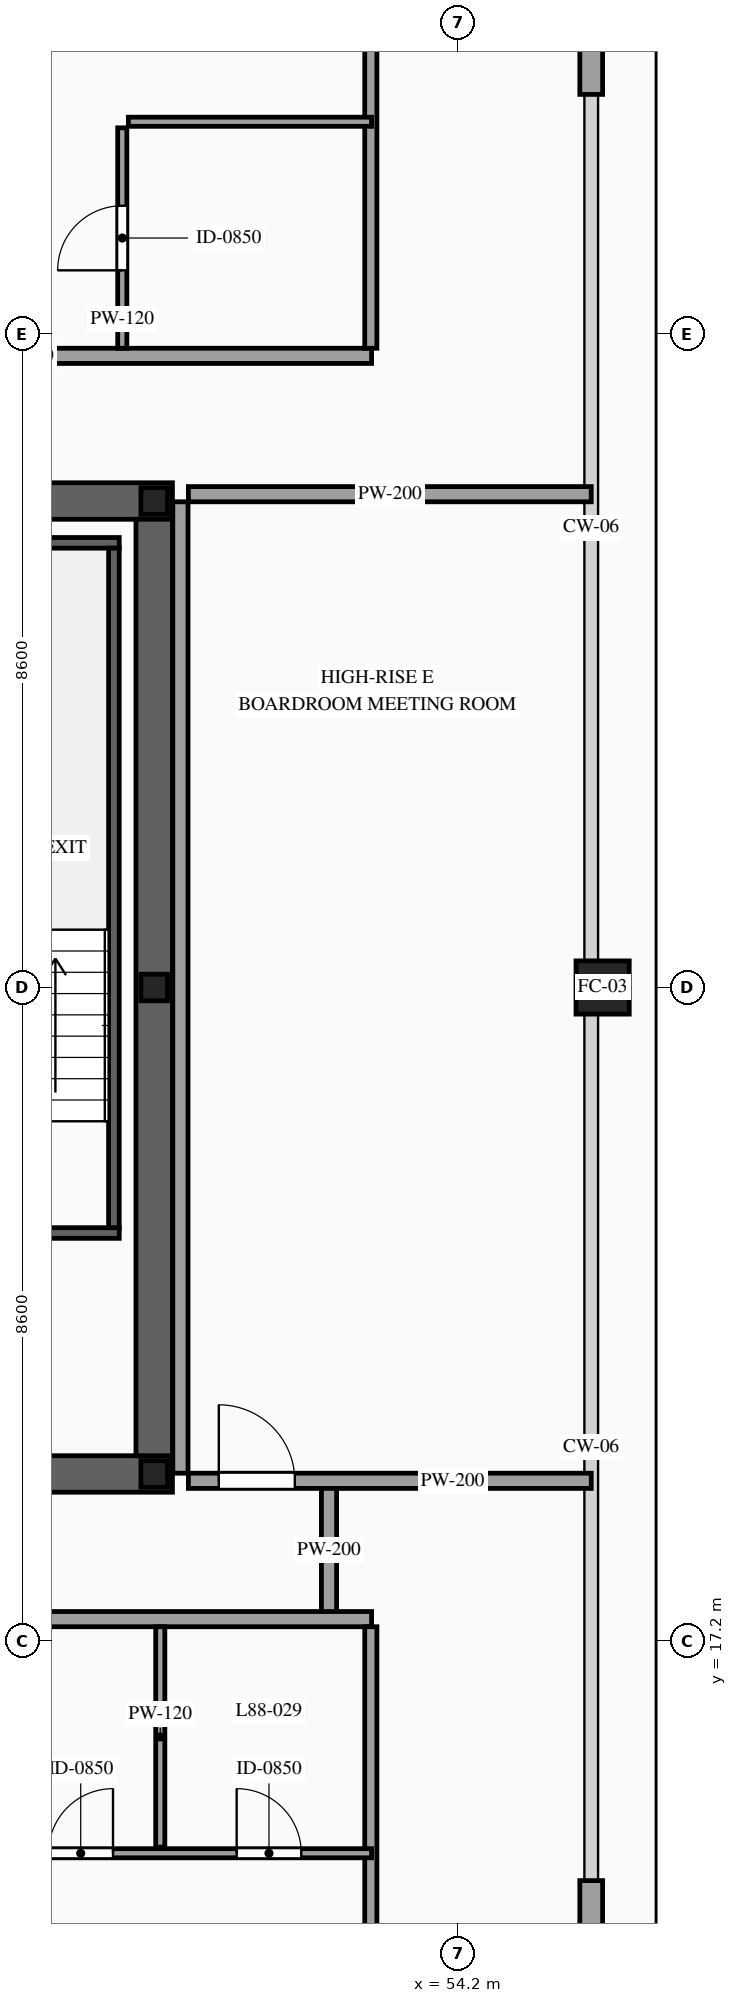
"""IFC4 building model, lengths in metres.
Left out: names, types, materials, properties, quantities, classifications, styles, units other than length and angle.
Written with IfcOpenShell. Run it as: python <this file> out.ifc"""

import sys

from ifc_helpers import new_model, si_unit, direction, frame, frame_2d, origin, origin_2d, place, context, subcontext, project, spatial, rectangle, hollow_rectangle, i_section, extrude, source, transform, mapped, element, fill, save


model = new_model("IFC4")
c1 = context("Model", 3, precision=1e-05, world=origin(), true_north=direction((0.0, 1.0)))
c2 = subcontext(c1, "Body", "Model", "MODEL_VIEW")
j1 = project(units=[si_unit("LENGTHUNIT", "METRE"), si_unit("PLANEANGLEUNIT", "RADIAN")], contexts=[c1])
p1 = place(None, origin())
s1 = spatial("IfcSite", under=j1, at=p1, CompositionType="ELEMENT")
p2 = place(p1, origin())
s2 = spatial("IfcBuilding", under=s1, at=p2, CompositionType="ELEMENT")
p3 = place(p2, frame((0.0, 0.0, 328.7)))
s3 = spatial("IfcBuildingStorey", under=s2, at=p3, CompositionType="ELEMENT", Elevation=328.7)
p4 = place(p3, frame((23.56, 19.4, 0.0), z_axis=(0.0, 0.0, 1.0), x_axis=(1.0, 0.0, 0.0)))
e1 = element("IfcWall", 1, at=p4, inside=s3, PredefinedType="SHEAR", context=c2, shape_type="SweptSolid", body=[
    extrude(rectangle(XDim=26.88, YDim=0.48, at=frame_2d((13.44, 0.0))), origin(), (0.0, 0.0, 1.0), 3.5),
])
p5 = place(p4, frame((1.89, 0.0, 0.0)))
e2 = element("IfcOpeningElement", 2, at=p5, cuts=e1, PredefinedType="OPENING", context=c2, shape_type="SweptSolid", body=[
    extrude(rectangle(XDim=1.1, YDim=2.2, at=frame_2d((0.55, 1.1))), frame((0.0, 0.255, 0.0), z_axis=(0.0, -1.0, 0.0), x_axis=(1.0, 0.0, 0.0)), (0.0, 0.0, 1.0), 0.51),
])
p6 = place(p4, frame((9.79, 0.0, 0.0)))
e3 = element("IfcOpeningElement", 3, at=p6, cuts=e1, PredefinedType="OPENING", context=c2, shape_type="SweptSolid", body=[
    extrude(rectangle(XDim=1.1, YDim=2.2, at=frame_2d((0.55, 1.1))), frame((0.0, 0.255, 0.0), z_axis=(0.0, -1.0, 0.0), x_axis=(1.0, 0.0, 0.0)), (0.0, 0.0, 1.0), 0.51),
])
p7 = place(p4, frame((22.99, 0.0, 0.0)))
e4 = element("IfcOpeningElement", 4, at=p7, cuts=e1, PredefinedType="OPENING", context=c2, shape_type="SweptSolid", body=[
    extrude(rectangle(XDim=1.1, YDim=2.2, at=frame_2d((0.55, 1.1))), frame((0.0, 0.255, 0.0), z_axis=(0.0, -1.0, 0.0), x_axis=(1.0, 0.0, 0.0)), (0.0, 0.0, 1.0), 0.51),
])
p8 = place(p4, frame((19.61, 0.0, 0.0)))
e5 = element("IfcOpeningElement", 5, at=p8, cuts=e1, PredefinedType="OPENING", context=c2, shape_type="SweptSolid", body=[
    extrude(rectangle(XDim=0.9, YDim=2.15, at=frame_2d((0.45, 1.075))), frame((0.0, 0.255, 0.0), z_axis=(0.0, -1.0, 0.0), x_axis=(1.0, 0.0, 0.0)), (0.0, 0.0, 1.0), 0.51),
])
p9 = place(p4, frame((18.17, 0.0, 0.0)))
e6 = element("IfcOpeningElement", 6, at=p9, cuts=e1, PredefinedType="OPENING", context=c2, shape_type="SweptSolid", body=[
    extrude(rectangle(XDim=0.9, YDim=2.15, at=frame_2d((0.45, 1.075))), frame((0.0, 0.255, 0.0), z_axis=(0.0, -1.0, 0.0), x_axis=(1.0, 0.0, 0.0)), (0.0, 0.0, 1.0), 0.51),
])
p10 = place(p3, frame((23.56, 32.2, 0.0), z_axis=(0.0, 0.0, 1.0), x_axis=(1.0, 0.0, 0.0)))
e7 = element("IfcWall", 7, at=p10, inside=s3, PredefinedType="SHEAR", context=c2, shape_type="SweptSolid", body=[
    extrude(rectangle(XDim=26.88, YDim=0.48, at=frame_2d((13.44, 0.0))), origin(), (0.0, 0.0, 1.0), 3.5),
])
p11 = place(p10, frame((4.51, 0.0, 0.0)))
e8 = element("IfcOpeningElement", 8, at=p11, cuts=e7, PredefinedType="OPENING", context=c2, shape_type="SweptSolid", body=[
    extrude(rectangle(XDim=0.9, YDim=2.15, at=frame_2d((0.45, 1.075))), frame((0.0, 0.255, 0.0), z_axis=(0.0, -1.0, 0.0), x_axis=(1.0, 0.0, 0.0)), (0.0, 0.0, 1.0), 0.51),
])
p12 = place(p10, frame((9.79, 0.0, 0.0)))
e9 = element("IfcOpeningElement", 9, at=p12, cuts=e7, PredefinedType="OPENING", context=c2, shape_type="SweptSolid", body=[
    extrude(rectangle(XDim=1.1, YDim=2.2, at=frame_2d((0.55, 1.1))), frame((0.0, 0.255, 0.0), z_axis=(0.0, -1.0, 0.0), x_axis=(1.0, 0.0, 0.0)), (0.0, 0.0, 1.0), 0.51),
])
p13 = place(p10, frame((15.64, 0.0, 0.0)))
e10 = element("IfcOpeningElement", 10, at=p13, cuts=e7, PredefinedType="OPENING", context=c2, shape_type="SweptSolid", body=[
    extrude(rectangle(XDim=1.1, YDim=2.2, at=frame_2d((0.55, 1.1))), frame((0.0, 0.255, 0.0), z_axis=(0.0, -1.0, 0.0), x_axis=(1.0, 0.0, 0.0)), (0.0, 0.0, 1.0), 0.51),
])
p14 = place(p10, frame((18.74, 0.0, 0.0)))
e11 = element("IfcOpeningElement", 11, at=p14, cuts=e7, PredefinedType="OPENING", context=c2, shape_type="SweptSolid", body=[
    extrude(rectangle(XDim=1.1, YDim=2.2, at=frame_2d((0.55, 1.1))), frame((0.0, 0.255, 0.0), z_axis=(0.0, -1.0, 0.0), x_axis=(1.0, 0.0, 0.0)), (0.0, 0.0, 1.0), 0.51),
])
m1 = source(origin(), c2, "Body", "SweptSolid", [
    extrude(rectangle(XDim=12.32, YDim=0.48, at=frame_2d((6.16, 0.0))), origin(), (0.0, 0.0, 1.0), 3.5),
])
p15 = place(p3, frame((50.2, 19.64, 0.0), z_axis=(0.0, 0.0, 1.0), x_axis=(0.0, 1.0, 0.0)))
e12 = element("IfcWall", 12, at=p15, inside=s3, PredefinedType="SHEAR", context=c2, shape_type="MappedRepresentation", body=[
    mapped(m1, transform((0.0, 0.0, 0.0), scale=1.0)),
])
m2 = source(origin(), c2, "Body", "SweptSolid", [
    extrude(i_section(OverallWidth=0.35, OverallDepth=0.35, WebThickness=0.012, FlangeThickness=0.019, at=origin_2d()), origin(), (0.0, 0.0, 1.0), 3.5),
])
for number, where, z_axis, x_axis in (
    (13, (50.2, 19.4, 0.0), (0.0, 0.0, 1.0), (1.0, 0.0, 0.0)),
    (14, (50.2, 25.8, 0.0), (0.0, 0.0, 1.0), (1.0, 0.0, 0.0)),
    (15, (50.2, 32.2, 0.0), (0.0, 0.0, 1.0), (1.0, 0.0, 0.0)),
):
    element("IfcColumn", number, at=place(p3, frame(where, z_axis=z_axis, x_axis=x_axis)), inside=s3, PredefinedType="COLUMN", context=c2, shape_type="MappedRepresentation", body=[
        mapped(m2, transform((0.0, 0.0, 0.0), scale=1.0)),
    ])
m3 = source(origin(), c2, "Body", "SweptSolid", [
    extrude(hollow_rectangle(XDim=0.7, YDim=0.7, WallThickness=0.032, at=origin_2d()), origin(), (0.0, 0.0, 1.0), 3.5),
])
p16 = place(p3, frame((56.1, 25.8, 0.0), z_axis=(0.0, 0.0, 1.0), x_axis=(1.0, 0.0, 0.0)))
e16 = element("IfcColumn", 16, at=p16, inside=s3, PredefinedType="COLUMN", context=c2, shape_type="MappedRepresentation", body=[
    mapped(m3, transform((0.0, 0.0, 0.0), scale=1.0)),
])
m4 = source(origin(), c2, "Body", "SweptSolid", [
    extrude(rectangle(XDim=3.25, YDim=0.3, at=frame_2d((1.625, 0.0))), origin(), (0.0, 0.0, 1.0), 2.885),
])
for number, where, z_axis, x_axis in (
    (17, (55.95, 10.8, 0.0), (0.0, 0.0, 1.0), (0.0, 1.0, 0.0)),
    (18, (55.95, 37.55, 0.0), (0.0, 0.0, 1.0), (0.0, 1.0, 0.0)),
):
    element("IfcWall", number, at=place(p3, frame(where, z_axis=z_axis, x_axis=x_axis)), inside=s3, PredefinedType="SOLIDWALL", context=c2, shape_type="MappedRepresentation", body=[
        mapped(m4, transform((0.0, 0.0, 0.0), scale=1.0)),
    ])
p17 = place(p3, frame((46.46, 22.57, 0.0), z_axis=(0.0, 0.0, 1.0), x_axis=(1.0, 0.0, 0.0)))
e19 = element("IfcWall", 19, at=p17, inside=s3, PredefinedType="SOLIDWALL", context=c2, shape_type="SweptSolid", body=[
    extrude(rectangle(XDim=3.28, YDim=0.14, at=frame_2d((1.64, 0.0))), origin(), (0.0, 0.0, 1.0), 3.28),
])
p18 = place(p17, frame((1.09, 0.0, 0.0)))
e20 = element("IfcOpeningElement", 20, at=p18, cuts=e19, PredefinedType="OPENING", context=c2, shape_type="SweptSolid", body=[
    extrude(rectangle(XDim=1.1, YDim=2.2, at=frame_2d((0.55, 1.1))), frame((0.0, 0.085, 0.0), z_axis=(0.0, -1.0, 0.0), x_axis=(1.0, 0.0, 0.0)), (0.0, 0.0, 1.0), 0.17),
])
m5 = source(origin(), c2, "Body", "SweptSolid", [
    extrude(rectangle(XDim=3.28, YDim=0.14, at=frame_2d((1.64, 0.0))), origin(), (0.0, 0.0, 1.0), 3.28),
])
p19 = place(p3, frame((46.46, 31.65, 0.0), z_axis=(0.0, 0.0, 1.0), x_axis=(1.0, 0.0, 0.0)))
e21 = element("IfcWall", 21, at=p19, inside=s3, PredefinedType="SOLIDWALL", context=c2, shape_type="MappedRepresentation", body=[
    mapped(m5, transform((0.0, 0.0, 0.0), scale=1.0)),
])
m6 = source(origin(), c2, "Body", "SweptSolid", [
    extrude(rectangle(XDim=8.94, YDim=0.14, at=frame_2d((4.47, 0.0))), origin(), (0.0, 0.0, 1.0), 3.28),
])
p20 = place(p3, frame((49.67, 22.64, 0.0), z_axis=(0.0, 0.0, 1.0), x_axis=(0.0, 1.0, 0.0)))
e22 = element("IfcWall", 22, at=p20, inside=s3, PredefinedType="SOLIDWALL", context=c2, shape_type="MappedRepresentation", body=[
    mapped(m6, transform((0.0, 0.0, 0.0), scale=1.0)),
])
m7 = source(origin(), c2, "Body", "SweptSolid", [
    extrude(rectangle(XDim=1.7, YDim=0.2, at=frame_2d((0.85, 0.0))), origin(), (0.0, 0.0, 1.0), 3.28),
])
p21 = place(p3, frame((52.5, 17.55, 0.0), z_axis=(0.0, 0.0, 1.0), x_axis=(0.0, 1.0, 0.0)))
e23 = element("IfcWall", 23, at=p21, inside=s3, PredefinedType="PARTITIONING", context=c2, shape_type="MappedRepresentation", body=[
    mapped(m7, transform((0.0, 0.0, 0.0), scale=1.0)),
])
p22 = place(p3, frame((37.08, 17.49, 0.0), z_axis=(0.0, 0.0, 1.0), x_axis=(1.0, 0.0, 0.0)))
e24 = element("IfcWall", 24, at=p22, inside=s3, PredefinedType="PARTITIONING", context=c2, shape_type="SweptSolid", body=[
    extrude(rectangle(XDim=15.98, YDim=0.2, at=frame_2d((7.99, 0.0))), origin(), (0.0, 0.0, 1.0), 3.28),
])
p23 = place(p22, frame((8.816, 0.0, 0.0)))
e25 = element("IfcOpeningElement", 25, at=p23, cuts=e24, PredefinedType="OPENING", context=c2, shape_type="SweptSolid", body=[
    extrude(rectangle(XDim=1.0, YDim=2.2, at=frame_2d((0.5, 1.1))), frame((0.0, 0.115, 0.0), z_axis=(0.0, -1.0, 0.0), x_axis=(1.0, 0.0, 0.0)), (0.0, 0.0, 1.0), 0.23),
])
m8 = source(origin(), c2, "Body", "SweptSolid", [
    extrude(rectangle(XDim=10.39, YDim=0.16, at=frame_2d((5.195, 0.0))), origin(), (0.0, 0.0, 1.0), 3.28),
])
p24 = place(p3, frame((53.05, 7.0, 0.0), z_axis=(0.0, 0.0, 1.0), x_axis=(0.0, 1.0, 0.0)))
e26 = element("IfcWall", 26, at=p24, inside=s3, PredefinedType="PARTITIONING", context=c2, shape_type="MappedRepresentation", body=[
    mapped(m8, transform((0.0, 0.0, 0.0), scale=1.0)),
])
m9 = source(origin(), c2, "Body", "SweptSolid", [
    extrude(rectangle(XDim=2.9, YDim=0.12, at=frame_2d((1.45, 0.0))), origin(), (0.0, 0.0, 1.0), 2.825),
])
p25 = place(p3, frame((50.28, 14.49, 0.0), z_axis=(0.0, 0.0, 1.0), x_axis=(0.0, 1.0, 0.0)))
e27 = element("IfcWall", 27, at=p25, inside=s3, PredefinedType="PARTITIONING", context=c2, shape_type="MappedRepresentation", body=[
    mapped(m9, transform((0.0, 0.0, 0.0), scale=1.0)),
])
p26 = place(p3, frame((48.266, 14.41, 0.0), z_axis=(0.0, 0.0, 1.0), x_axis=(1.0, 0.0, 0.0)))
e28 = element("IfcWall", 28, at=p26, inside=s3, PredefinedType="PARTITIONING", context=c2, shape_type="SweptSolid", body=[
    extrude(rectangle(XDim=4.794, YDim=0.12, at=frame_2d((2.397, 0.0))), origin(), (0.0, 0.0, 1.0), 3.28),
])
p27 = place(p26, frame((3.019, 0.0, 0.0)))
e29 = element("IfcOpeningElement", 29, at=p27, cuts=e28, PredefinedType="OPENING", context=c2, shape_type="SweptSolid", body=[
    extrude(rectangle(XDim=0.85, YDim=2.1, at=frame_2d((0.425, 1.05))), frame((0.0, 0.075, 0.0), z_axis=(0.0, -1.0, 0.0), x_axis=(1.0, 0.0, 0.0)), (0.0, 0.0, 1.0), 0.15),
])
p28 = place(p26, frame((0.542, 0.0, 0.0)))
e30 = element("IfcOpeningElement", 30, at=p28, cuts=e28, PredefinedType="OPENING", context=c2, shape_type="SweptSolid", body=[
    extrude(rectangle(XDim=0.85, YDim=2.1, at=frame_2d((0.425, 1.05))), frame((0.0, 0.075, 0.0), z_axis=(0.0, -1.0, 0.0), x_axis=(1.0, 0.0, 0.0)), (0.0, 0.0, 1.0), 0.15),
])
p29 = place(p3, frame((36.438, 34.11, 0.0), z_axis=(0.0, 0.0, 1.0), x_axis=(1.0, 0.0, 0.0)))
e31 = element("IfcWall", 31, at=p29, inside=s3, PredefinedType="PARTITIONING", context=c2, shape_type="SweptSolid", body=[
    extrude(rectangle(XDim=16.622, YDim=0.2, at=frame_2d((8.311, 0.0))), origin(), (0.0, 0.0, 1.0), 3.28),
])
p30 = place(p29, frame((6.186, 0.0, 0.0)))
e32 = element("IfcOpeningElement", 32, at=p30, cuts=e31, PredefinedType="OPENING", context=c2, shape_type="SweptSolid", body=[
    extrude(rectangle(XDim=1.0, YDim=2.2, at=frame_2d((0.5, 1.1))), frame((0.0, 0.115, 0.0), z_axis=(0.0, -1.0, 0.0), x_axis=(1.0, 0.0, 0.0)), (0.0, 0.0, 1.0), 0.23),
])
m10 = source(origin(), c2, "Body", "SweptSolid", [
    extrude(rectangle(XDim=10.39, YDim=0.16, at=frame_2d((5.195, 0.0))), origin(), (0.0, 0.0, 1.0), 3.28),
])
p31 = place(p3, frame((53.05, 34.21, 0.0), z_axis=(0.0, 0.0, 1.0), x_axis=(0.0, 1.0, 0.0)))
e33 = element("IfcWall", 33, at=p31, inside=s3, PredefinedType="PARTITIONING", context=c2, shape_type="MappedRepresentation", body=[
    mapped(m10, transform((0.0, 0.0, 0.0), scale=1.0)),
])
m11 = source(origin(), c2, "Body", "SweptSolid", [
    extrude(rectangle(XDim=3.2, YDim=0.12, at=frame_2d((1.6, 0.0))), origin(), (0.0, 0.0, 1.0), 3.28),
])
p32 = place(p3, frame((49.86, 37.19, 0.0), z_axis=(0.0, 0.0, 1.0), x_axis=(1.0, 0.0, 0.0)))
e34 = element("IfcWall", 34, at=p32, inside=s3, PredefinedType="PARTITIONING", context=c2, shape_type="MappedRepresentation", body=[
    mapped(m11, transform((0.0, 0.0, 0.0), scale=1.0)),
])
p33 = place(p3, frame((49.78, 34.21, 0.0), z_axis=(0.0, 0.0, 1.0), x_axis=(0.0, 1.0, 0.0)))
e35 = element("IfcWall", 35, at=p33, inside=s3, PredefinedType="PARTITIONING", context=c2, shape_type="SweptSolid", body=[
    extrude(rectangle(XDim=2.9, YDim=0.12, at=frame_2d((1.45, 0.0))), origin(), (0.0, 0.0, 1.0), 3.28),
])
p34 = place(p33, frame((1.025, 0.0, 0.0)))
e36 = element("IfcOpeningElement", 36, at=p34, cuts=e35, PredefinedType="OPENING", context=c2, shape_type="SweptSolid", body=[
    extrude(rectangle(XDim=0.85, YDim=2.1, at=frame_2d((0.425, 1.05))), frame((0.0, 0.075, 0.0), z_axis=(0.0, -1.0, 0.0), x_axis=(1.0, 0.0, 0.0)), (0.0, 0.0, 1.0), 0.15),
])
p35 = place(p3, frame((50.65, 19.31, 0.0), z_axis=(0.0, 0.0, 1.0), x_axis=(1.0, 0.0, 0.0)))
e37 = element("IfcWall", 37, at=p35, inside=s3, PredefinedType="PARTITIONING", context=c2, shape_type="SweptSolid", body=[
    extrude(rectangle(XDim=5.3, YDim=0.2, at=frame_2d((2.65, 0.0))), origin(), (0.0, 0.0, 1.0), 2.825),
])
p36 = place(p35, frame((0.4, 0.0, 0.0)))
e38 = element("IfcOpeningElement", 38, at=p36, cuts=e37, PredefinedType="OPENING", context=c2, shape_type="SweptSolid", body=[
    extrude(rectangle(XDim=1.0, YDim=2.2, at=frame_2d((0.5, 1.1))), frame((0.0, 0.115, 0.0), z_axis=(0.0, -1.0, 0.0), x_axis=(1.0, 0.0, 0.0)), (0.0, 0.0, 1.0), 0.23),
])
m12 = source(origin(), c2, "Body", "SweptSolid", [
    extrude(rectangle(XDim=5.3, YDim=0.2, at=frame_2d((2.65, 0.0))), origin(), (0.0, 0.0, 1.0), 2.825),
])
p37 = place(p3, frame((50.65, 32.29, 0.0), z_axis=(0.0, 0.0, 1.0), x_axis=(1.0, 0.0, 0.0)))
e39 = element("IfcWall", 39, at=p37, inside=s3, PredefinedType="PARTITIONING", context=c2, shape_type="MappedRepresentation", body=[
    mapped(m12, transform((0.0, 0.0, 0.0), scale=1.0)),
])
m13 = source(origin(), c2, "Body", "SweptSolid", [
    extrude(rectangle(XDim=12.78, YDim=0.2, at=frame_2d((6.39, 0.0))), origin(), (0.0, 0.0, 1.0), 3.28),
])
p38 = place(p3, frame((50.545, 19.41, 0.0), z_axis=(0.0, 0.0, 1.0), x_axis=(0.0, 1.0, 0.0)))
e40 = element("IfcWall", 40, at=p38, inside=s3, PredefinedType="PARTITIONING", context=c2, shape_type="MappedRepresentation", body=[
    mapped(m13, transform((0.0, 0.0, 0.0), scale=1.0)),
])
m14 = source(origin(), c2, "Body", "SweptSolid", [
    extrude(rectangle(XDim=0.85, YDim=2.1, at=frame_2d((0.425, 1.05))), frame((0.0, 0.025, 0.0), z_axis=(0.0, -1.0, 0.0), x_axis=(1.0, 0.0, 0.0)), (0.0, 0.0, 1.0), 0.05),
])
p39 = place(p27, origin())
e41 = element("IfcDoor", 41, at=p39, inside=s3, OperationType="SINGLE_SWING_LEFT", PredefinedType="DOOR", context=c2, shape_type="MappedRepresentation", body=[
    mapped(m14, transform((0.0, 0.0, 0.0), scale=1.0)),
])
fill(e29, e41)
p40 = place(p28, origin())
e42 = element("IfcDoor", 42, at=p40, inside=s3, OperationType="SINGLE_SWING_RIGHT", PredefinedType="DOOR", context=c2, shape_type="MappedRepresentation", body=[
    mapped(m14, transform((0.0, 0.0, 0.0), scale=1.0)),
])
fill(e30, e42)
p41 = place(p34, origin())
e43 = element("IfcDoor", 43, at=p41, inside=s3, OperationType="SINGLE_SWING_LEFT", PredefinedType="DOOR", context=c2, shape_type="MappedRepresentation", body=[
    mapped(m14, transform((0.0, 0.0, 0.0), scale=1.0)),
])
fill(e36, e43)
m15 = source(origin(), c2, "Body", "SweptSolid", [
    extrude(rectangle(XDim=1.0, YDim=2.2, at=frame_2d((0.5, 1.1))), frame((0.0, 0.025, 0.0), z_axis=(0.0, -1.0, 0.0), x_axis=(1.0, 0.0, 0.0)), (0.0, 0.0, 1.0), 0.05),
])
p42 = place(p36, origin())
e44 = element("IfcDoor", 44, at=p42, inside=s3, OperationType="SINGLE_SWING_LEFT", PredefinedType="DOOR", context=c2, shape_type="MappedRepresentation", body=[
    mapped(m15, transform((0.0, 0.0, 0.0), scale=1.0)),
])
fill(e38, e44)
save(model, sys.argv[1])
